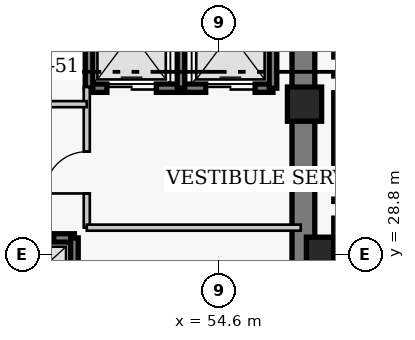
"""IFC4 building model, lengths in metres.
Left out: names, types, materials, properties, quantities, classifications, styles, units other than length and angle.
Written with IfcOpenShell. Run it as: python <this file> out.ifc"""

import sys

from ifc_helpers import new_model, si_unit, direction, frame, frame_2d, origin, origin_2d, place, context, subcontext, project, spatial, rectangle, extrude, element, fill, save


model = new_model("IFC4")
c1 = context("Model", 3, precision=1e-05, world=origin(), true_north=direction((0.0, 1.0)))
c2 = subcontext(c1, "Body", "Model", "MODEL_VIEW")
j1 = project(units=[si_unit("LENGTHUNIT", "METRE"), si_unit("PLANEANGLEUNIT", "RADIAN")], contexts=[c1])
p1 = place(None, origin())
s1 = spatial("IfcSite", under=j1, at=p1, CompositionType="ELEMENT")
p2 = place(p1, origin())
s2 = spatial("IfcBuilding", under=s1, at=p2, CompositionType="ELEMENT")
p3 = place(p2, frame((0.0, 0.0, 192.9)))
s3 = spatial("IfcBuildingStorey", under=s2, at=p3, CompositionType="ELEMENT", Elevation=192.9)
p4 = place(p3, frame((56.82, 27.05, 0.0), z_axis=(0.0, 0.0, 1.0), x_axis=(0.0, 1.0, 0.0)))
e1 = element("IfcWall", 1, at=p4, inside=s3, PredefinedType="SHEAR", context=c2, shape_type="SweptSolid", body=[
    extrude(rectangle(XDim=13.57, YDim=0.6, at=frame_2d((6.785, 0.0))), origin(), (0.0, 0.0, 1.0), 3.9),
])
for number, where, z_axis, x_axis in (
    (2, (57.35, 28.8, 0.0), (0.0, 0.0, 1.0), (1.0, 0.0, 0.0)),
    (3, (56.85, 32.75, 0.0), (0.0, 0.0, 1.0), (1.0, 0.0, 0.0)),
):
    element("IfcColumn", number, at=place(p3, frame(where, z_axis=z_axis, x_axis=x_axis)), inside=s3, PredefinedType="COLUMN", context=c2, shape_type="SweptSolid", body=[
        extrude(rectangle(XDim=0.9, YDim=0.9, at=origin_2d()), origin(), (0.0, 0.0, 1.0), 3.9),
    ])
p5 = place(p3, frame((48.55, 29.23, 0.0), z_axis=(0.0, 0.0, 1.0), x_axis=(1.0, 0.0, 0.0)))
e4 = element("IfcWall", 4, at=p5, inside=s3, PredefinedType="SHEAR", context=c2, shape_type="SweptSolid", body=[
    extrude(rectangle(XDim=2.245, YDim=0.22, at=frame_2d((1.123, 0.0))), origin(), (0.0, 0.0, 1.0), 3.9),
])
p6 = place(p5, frame((0.6, 0.0, 0.0)))
e5 = element("IfcOpeningElement", 5, at=p6, cuts=e4, PredefinedType="OPENING", context=c2, shape_type="SweptSolid", body=[
    extrude(rectangle(XDim=1.1, YDim=2.15, at=frame_2d((0.55, 1.075))), frame((0.0, 0.12, 0.0), z_axis=(0.0, -1.0, 0.0), x_axis=(1.0, 0.0, 0.0)), (0.0, 0.0, 1.0), 0.24),
])
p7 = place(p3, frame((50.795, 27.17, 0.0), z_axis=(0.0, 0.0, 1.0), x_axis=(0.0, 1.0, 0.0)))
e6 = element("IfcWall", 6, at=p7, inside=s3, PredefinedType="SHEAR", context=c2, shape_type="SweptSolid", body=[
    extrude(rectangle(XDim=2.06, YDim=0.2, at=frame_2d((1.03, 0.0))), origin(), (0.0, 0.0, 1.0), 3.9),
])
p8 = place(p3, frame((51.18, 33.17, 0.0), z_axis=(0.0, 0.0, 1.0), x_axis=(1.0, 0.0, 0.0)))
e7 = element("IfcWall", 7, at=p8, inside=s3, PredefinedType="SHEAR", context=c2, shape_type="SweptSolid", body=[
    extrude(rectangle(XDim=2.42, YDim=0.22, at=frame_2d((1.21, 0.0))), origin(), (0.0, 0.0, 1.0), 3.9),
])
p9 = place(p8, frame((0.47, 0.0, 0.0)))
e8 = element("IfcOpeningElement", 8, at=p9, cuts=e7, PredefinedType="OPENING", context=c2, shape_type="SweptSolid", body=[
    extrude(rectangle(XDim=1.3, YDim=2.15, at=frame_2d((0.65, 1.075))), frame((0.0, 0.12, 0.0), z_axis=(0.0, -1.0, 0.0), x_axis=(1.0, 0.0, 0.0)), (0.0, 0.0, 1.0), 0.24),
])
p10 = place(p3, frame((51.18, 33.17, 0.0), z_axis=(0.0, 0.0, 1.0), x_axis=(0.0, 1.0, 0.0)))
e9 = element("IfcWall", 9, at=p10, inside=s3, PredefinedType="SHEAR", context=c2, shape_type="SweptSolid", body=[
    extrude(rectangle(XDim=2.86, YDim=0.2, at=frame_2d((1.43, 0.0))), origin(), (0.0, 0.0, 1.0), 3.9),
])
p11 = place(p3, frame((53.6, 33.17, 0.0), z_axis=(0.0, 0.0, 1.0), x_axis=(1.0, 0.0, 0.0)))
e10 = element("IfcWall", 10, at=p11, inside=s3, PredefinedType="SHEAR", context=c2, shape_type="SweptSolid", body=[
    extrude(rectangle(XDim=2.42, YDim=0.22, at=frame_2d((1.21, 0.0))), origin(), (0.0, 0.0, 1.0), 3.9),
])
p12 = place(p11, frame((0.65, 0.0, 0.0)))
e11 = element("IfcOpeningElement", 11, at=p12, cuts=e10, PredefinedType="OPENING", context=c2, shape_type="SweptSolid", body=[
    extrude(rectangle(XDim=1.3, YDim=2.15, at=frame_2d((0.65, 1.075))), frame((0.0, 0.12, 0.0), z_axis=(0.0, -1.0, 0.0), x_axis=(1.0, 0.0, 0.0)), (0.0, 0.0, 1.0), 0.24),
])
for number, where, z_axis, x_axis in (
    (12, (53.6, 33.17, 0.0), (0.0, 0.0, 1.0), (0.0, 1.0, 0.0)),
    (13, (56.02, 33.17, 0.0), (0.0, 0.0, 1.0), (0.0, 1.0, 0.0)),
):
    element("IfcWall", number, at=place(p3, frame(where, z_axis=z_axis, x_axis=x_axis)), inside=s3, PredefinedType="SHEAR", context=c2, shape_type="SweptSolid", body=[
        extrude(rectangle(XDim=2.86, YDim=0.2, at=frame_2d((1.43, 0.0))), origin(), (0.0, 0.0, 1.0), 3.9),
    ])
p13 = place(p3, frame((51.12, 29.5, 0.0), z_axis=(0.0, 0.0, 1.0), x_axis=(0.0, 1.0, 0.0)))
e14 = element("IfcWall", 14, at=p13, inside=s3, PredefinedType="PARTITIONING", context=c2, shape_type="SweptSolid", body=[
    extrude(rectangle(XDim=3.7, YDim=0.16, at=frame_2d((1.85, 0.0))), origin(), (0.0, 0.0, 1.0), 3.65),
])
p14 = place(p13, frame((0.9, 0.0, 0.0)))
e15 = element("IfcOpeningElement", 15, at=p14, cuts=e14, PredefinedType="OPENING", context=c2, shape_type="SweptSolid", body=[
    extrude(rectangle(XDim=1.1, YDim=2.15, at=frame_2d((0.55, 1.075))), frame((0.0, 0.09, 0.0), z_axis=(0.0, -1.0, 0.0), x_axis=(1.0, 0.0, 0.0)), (0.0, 0.0, 1.0), 0.18),
])
p15 = place(p3, frame((51.12, 29.5, 0.0), z_axis=(0.0, 0.0, 1.0), x_axis=(1.0, 0.0, 0.0)))
e16 = element("IfcWall", 16, at=p15, inside=s3, PredefinedType="PARTITIONING", context=c2, shape_type="SweptSolid", body=[
    extrude(rectangle(XDim=5.63, YDim=0.16, at=frame_2d((2.815, 0.0))), origin(), (0.0, 0.0, 1.0), 3.65),
])
p16 = place(p3, frame((48.92, 32.75, 0.0), z_axis=(0.0, 0.0, 1.0), x_axis=(1.0, 0.0, 0.0)))
e17 = element("IfcWall", 17, at=p16, inside=s3, PredefinedType="PARTITIONING", context=c2, shape_type="SweptSolid", body=[
    extrude(rectangle(XDim=2.2, YDim=0.16, at=frame_2d((1.1, 0.0))), origin(), (0.0, 0.0, 1.0), 3.65),
])
p17 = place(p6, origin())
e18 = element("IfcDoor", 18, at=p17, inside=s3, OperationType="DOUBLE_DOOR_SLIDING", PredefinedType="DOOR", context=c2, shape_type="SweptSolid", body=[
    extrude(rectangle(XDim=1.1, YDim=2.15, at=frame_2d((0.55, 1.075))), frame((0.0, 0.025, 0.0), z_axis=(0.0, -1.0, 0.0), x_axis=(1.0, 0.0, 0.0)), (0.0, 0.0, 1.0), 0.05),
])
fill(e5, e18)
p18 = place(p9, origin())
e19 = element("IfcDoor", 19, at=p18, inside=s3, OperationType="DOUBLE_DOOR_SLIDING", PredefinedType="DOOR", context=c2, shape_type="SweptSolid", body=[
    extrude(rectangle(XDim=1.3, YDim=2.15, at=frame_2d((0.65, 1.075))), frame((0.0, 0.025, 0.0), z_axis=(0.0, -1.0, 0.0), x_axis=(1.0, 0.0, 0.0)), (0.0, 0.0, 1.0), 0.05),
])
fill(e8, e19)
p19 = place(p12, origin())
e20 = element("IfcDoor", 20, at=p19, inside=s3, OperationType="DOUBLE_DOOR_SLIDING", PredefinedType="DOOR", context=c2, shape_type="SweptSolid", body=[
    extrude(rectangle(XDim=1.3, YDim=2.15, at=frame_2d((0.65, 1.075))), frame((0.0, 0.025, 0.0), z_axis=(0.0, -1.0, 0.0), x_axis=(1.0, 0.0, 0.0)), (0.0, 0.0, 1.0), 0.05),
])
fill(e11, e20)
p20 = place(p14, origin())
e21 = element("IfcDoor", 21, at=p20, inside=s3, OperationType="SINGLE_SWING_LEFT", PredefinedType="DOOR", context=c2, shape_type="SweptSolid", body=[
    extrude(rectangle(XDim=1.1, YDim=2.15, at=frame_2d((0.55, 1.075))), frame((0.0, 0.025, 0.0), z_axis=(0.0, -1.0, 0.0), x_axis=(1.0, 0.0, 0.0)), (0.0, 0.0, 1.0), 0.05),
])
fill(e15, e21)
save(model, sys.argv[1])
